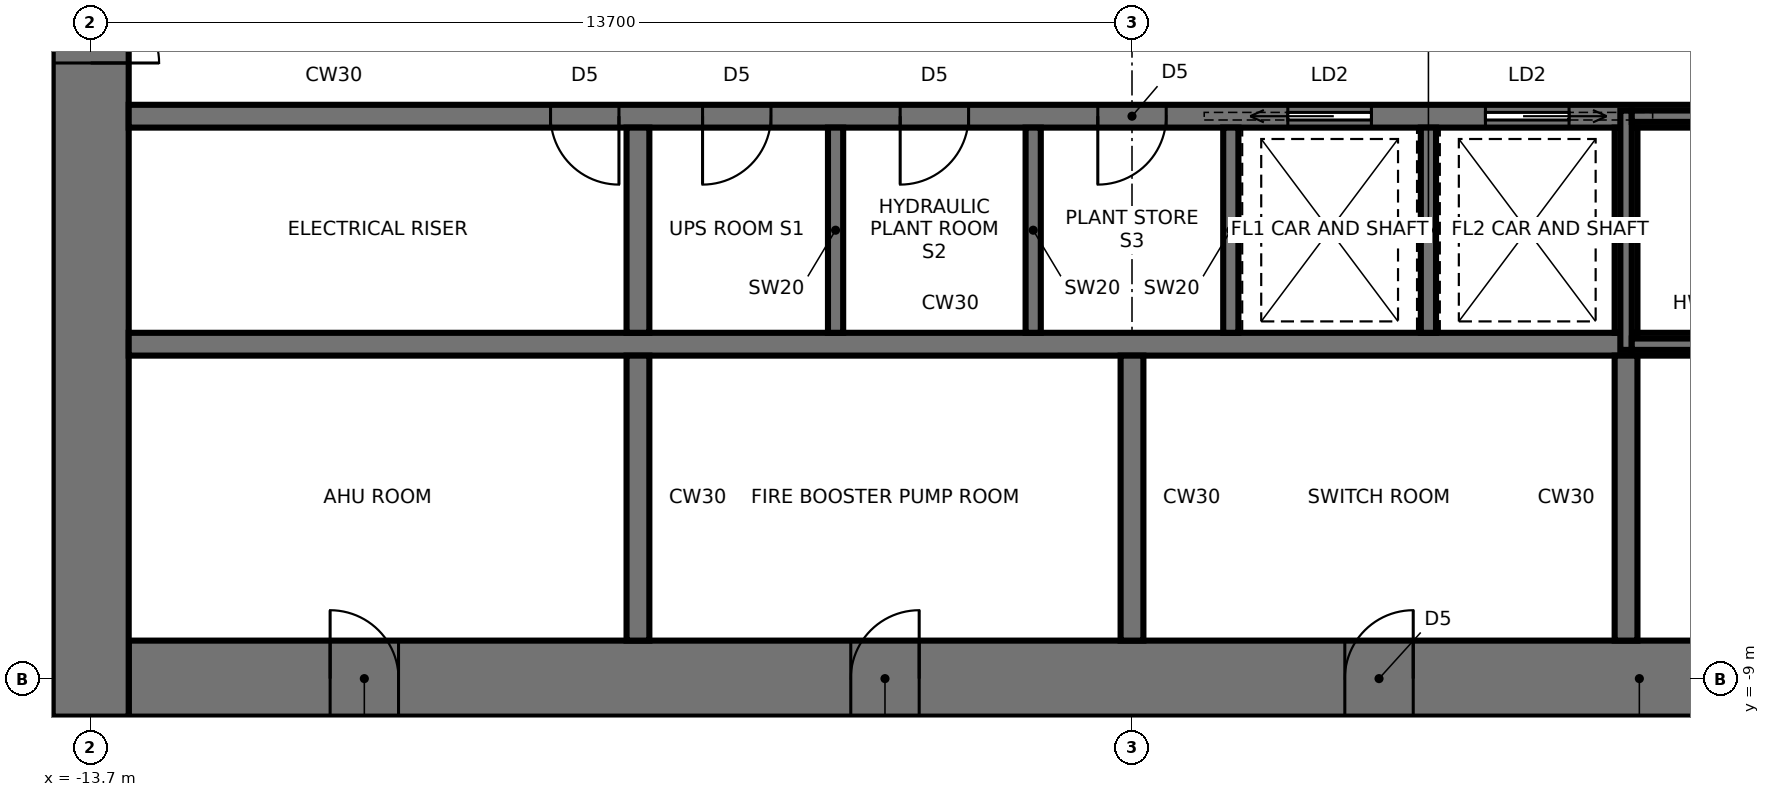
"""IFC4 building model, lengths in metres.
Left out: names, types, materials, properties, quantities, classifications, styles, units other than length and angle.
Written with IfcOpenShell. Run it as: python <this file> out.ifc"""

import sys

from ifc_helpers import new_model, si_unit, direction, frame, frame_2d, origin, place, context, subcontext, project, spatial, rectangle, extrude, element, fill, save


model = new_model("IFC4")
c1 = context("Model", 3, precision=1e-05, world=origin(), true_north=direction((0.0, 1.0)))
c2 = subcontext(c1, "Body", "Model", "MODEL_VIEW")
j1 = project(units=[si_unit("LENGTHUNIT", "METRE"), si_unit("PLANEANGLEUNIT", "RADIAN")], contexts=[c1])
p1 = place(None, origin())
s1 = spatial("IfcSite", under=j1, at=p1, CompositionType="ELEMENT")
p2 = place(p1, origin())
s2 = spatial("IfcBuilding", under=s1, at=p2, CompositionType="ELEMENT")
p3 = place(p2, frame((0.0, 0.0, 277.0)))
s3 = spatial("IfcBuildingStorey", under=s2, at=p3, CompositionType="ELEMENT", Elevation=277.0)
p4 = place(p3, frame((-13.2, -9.0, 0.0), z_axis=(0.0, 0.0, 1.0), x_axis=(1.0, 0.0, 0.0)))
e1 = element("IfcWall", 1, at=p4, inside=s3, PredefinedType="SHEAR", context=c2, shape_type="SweptSolid", body=[
    extrude(rectangle(XDim=26.4, YDim=1.0, at=frame_2d((13.2, 0.0))), origin(), (0.0, 0.0, 1.0), 5.0),
])
p5 = place(p4, frame((2.65, 0.0, 0.0)))
e2 = element("IfcOpeningElement", 2, at=p5, cuts=e1, PredefinedType="OPENING", context=c2, shape_type="SweptSolid", body=[
    extrude(rectangle(XDim=0.9, YDim=2.1, at=frame_2d((0.45, 1.05))), frame((0.0, 0.51, 0.0), z_axis=(0.0, -1.0, 0.0), x_axis=(1.0, 0.0, 0.0)), (0.0, 0.0, 1.0), 1.02),
])
p6 = place(p4, frame((9.5, 0.0, 0.0)))
e3 = element("IfcOpeningElement", 3, at=p6, cuts=e1, PredefinedType="OPENING", context=c2, shape_type="SweptSolid", body=[
    extrude(rectangle(XDim=0.9, YDim=2.1, at=frame_2d((0.45, 1.05))), frame((0.0, 0.51, 0.0), z_axis=(0.0, -1.0, 0.0), x_axis=(1.0, 0.0, 0.0)), (0.0, 0.0, 1.0), 1.02),
])
p7 = place(p4, frame((16.0, 0.0, 0.0)))
e4 = element("IfcOpeningElement", 4, at=p7, cuts=e1, PredefinedType="OPENING", context=c2, shape_type="SweptSolid", body=[
    extrude(rectangle(XDim=0.9, YDim=2.1, at=frame_2d((0.45, 1.05))), frame((0.0, 0.51, 0.0), z_axis=(0.0, -1.0, 0.0), x_axis=(1.0, 0.0, 0.0)), (0.0, 0.0, 1.0), 1.02),
])
p8 = place(p4, frame((22.85, 0.0, 0.0)))
e5 = element("IfcOpeningElement", 5, at=p8, cuts=e1, PredefinedType="OPENING", context=c2, shape_type="SweptSolid", body=[
    extrude(rectangle(XDim=0.9, YDim=2.1, at=frame_2d((0.45, 1.05))), frame((0.0, 0.51, 0.0), z_axis=(0.0, -1.0, 0.0), x_axis=(1.0, 0.0, 0.0)), (0.0, 0.0, 1.0), 1.02),
])
p9 = place(p3, frame((-13.7, 9.5, 0.0), z_axis=(0.0, 0.0, 1.0), x_axis=(0.0, -1.0, 0.0)))
e6 = element("IfcWall", 6, at=p9, inside=s3, PredefinedType="SHEAR", context=c2, shape_type="SweptSolid", body=[
    extrude(rectangle(XDim=19.0, YDim=1.0, at=frame_2d((9.5, 0.0))), origin(), (0.0, 0.0, 1.0), 5.0),
])
p10 = place(p9, frame((8.6, 0.0, 0.0)))
e7 = element("IfcOpeningElement", 7, at=p10, cuts=e6, PredefinedType="OPENING", context=c2, shape_type="SweptSolid", body=[
    extrude(rectangle(XDim=1.8, YDim=2.4, at=frame_2d((0.9, 1.2))), frame((0.0, 0.51, 0.0), z_axis=(0.0, -1.0, 0.0), x_axis=(1.0, 0.0, 0.0)), (0.0, 0.0, 1.0), 1.02),
])
p11 = place(p3, frame((-13.2, -1.6, 0.0), z_axis=(0.0, 0.0, 1.0), x_axis=(1.0, 0.0, 0.0)))
e8 = element("IfcWall", 8, at=p11, inside=s3, PredefinedType="SHEAR", context=c2, shape_type="SweptSolid", body=[
    extrude(rectangle(XDim=26.4, YDim=0.3, at=frame_2d((13.2, 0.0))), origin(), (0.0, 0.0, 1.0), 5.0),
])
p12 = place(p11, frame((25.15, 0.0, 0.0)))
e9 = element("IfcOpeningElement", 9, at=p12, cuts=e8, PredefinedType="OPENING", context=c2, shape_type="SweptSolid", body=[
    extrude(rectangle(XDim=1.0, YDim=2.1, at=frame_2d((0.5, 1.05))), frame((0.0, 0.16, 0.0), z_axis=(0.0, -1.0, 0.0), x_axis=(1.0, 0.0, 0.0)), (0.0, 0.0, 1.0), 0.32),
])
p13 = place(p11, frame((7.55, 0.0, 0.0)))
e10 = element("IfcOpeningElement", 10, at=p13, cuts=e8, PredefinedType="OPENING", context=c2, shape_type="SweptSolid", body=[
    extrude(rectangle(XDim=0.9, YDim=2.1, at=frame_2d((0.45, 1.05))), frame((0.0, 0.16, 0.0), z_axis=(0.0, -1.0, 0.0), x_axis=(1.0, 0.0, 0.0)), (0.0, 0.0, 1.0), 0.32),
])
p14 = place(p11, frame((10.15, 0.0, 0.0)))
e11 = element("IfcOpeningElement", 11, at=p14, cuts=e8, PredefinedType="OPENING", context=c2, shape_type="SweptSolid", body=[
    extrude(rectangle(XDim=0.9, YDim=2.1, at=frame_2d((0.45, 1.05))), frame((0.0, 0.16, 0.0), z_axis=(0.0, -1.0, 0.0), x_axis=(1.0, 0.0, 0.0)), (0.0, 0.0, 1.0), 0.32),
])
p15 = place(p11, frame((12.75, 0.0, 0.0)))
e12 = element("IfcOpeningElement", 12, at=p15, cuts=e8, PredefinedType="OPENING", context=c2, shape_type="SweptSolid", body=[
    extrude(rectangle(XDim=0.9, YDim=2.1, at=frame_2d((0.45, 1.05))), frame((0.0, 0.16, 0.0), z_axis=(0.0, -1.0, 0.0), x_axis=(1.0, 0.0, 0.0)), (0.0, 0.0, 1.0), 0.32),
])
p16 = place(p11, frame((15.25, 0.0, 0.0)))
e13 = element("IfcOpeningElement", 13, at=p16, cuts=e8, PredefinedType="OPENING", context=c2, shape_type="SweptSolid", body=[
    extrude(rectangle(XDim=1.1, YDim=2.3, at=frame_2d((0.55, 1.15))), frame((0.0, 0.16, 0.0), z_axis=(0.0, -1.0, 0.0), x_axis=(1.0, 0.0, 0.0)), (0.0, 0.0, 1.0), 0.32),
])
p17 = place(p11, frame((17.85, 0.0, 0.0)))
e14 = element("IfcOpeningElement", 14, at=p17, cuts=e8, PredefinedType="OPENING", context=c2, shape_type="SweptSolid", body=[
    extrude(rectangle(XDim=1.1, YDim=2.3, at=frame_2d((0.55, 1.15))), frame((0.0, 0.16, 0.0), z_axis=(0.0, -1.0, 0.0), x_axis=(1.0, 0.0, 0.0)), (0.0, 0.0, 1.0), 0.32),
])
p18 = place(p11, frame((5.55, 0.0, 0.0)))
e15 = element("IfcOpeningElement", 15, at=p18, cuts=e8, PredefinedType="OPENING", context=c2, shape_type="SweptSolid", body=[
    extrude(rectangle(XDim=0.9, YDim=2.1, at=frame_2d((0.45, 1.05))), frame((0.0, 0.16, 0.0), z_axis=(0.0, -1.0, 0.0), x_axis=(1.0, 0.0, 0.0)), (0.0, 0.0, 1.0), 0.32),
])
p19 = place(p3, frame((-13.2, -4.6, 0.0), z_axis=(0.0, 0.0, 1.0), x_axis=(1.0, 0.0, 0.0)))
e16 = element("IfcWall", 16, at=p19, inside=s3, PredefinedType="SHEAR", context=c2, shape_type="SweptSolid", body=[
    extrude(rectangle(XDim=26.4, YDim=0.3, at=frame_2d((13.2, 0.0))), origin(), (0.0, 0.0, 1.0), 5.0),
])
p20 = place(p3, frame((-6.5, -1.75, 0.0), z_axis=(0.0, 0.0, 1.0), x_axis=(0.0, -1.0, 0.0)))
e17 = element("IfcWall", 17, at=p20, inside=s3, PredefinedType="SHEAR", context=c2, shape_type="SweptSolid", body=[
    extrude(rectangle(XDim=2.7, YDim=0.3, at=frame_2d((1.35, 0.0))), origin(), (0.0, 0.0, 1.0), 5.0),
])
p21 = place(p3, frame((-6.5, -4.75, 0.0), z_axis=(0.0, 0.0, 1.0), x_axis=(0.0, -1.0, 0.0)))
e18 = element("IfcWall", 18, at=p21, inside=s3, PredefinedType="SHEAR", context=c2, shape_type="SweptSolid", body=[
    extrude(rectangle(XDim=3.75, YDim=0.3, at=frame_2d((1.875, 0.0))), origin(), (0.0, 0.0, 1.0), 5.0),
])
p22 = place(p3, frame((6.5, -1.75, 0.0), z_axis=(0.0, 0.0, 1.0), x_axis=(0.0, -1.0, 0.0)))
e19 = element("IfcWall", 19, at=p22, inside=s3, PredefinedType="SHEAR", context=c2, shape_type="SweptSolid", body=[
    extrude(rectangle(XDim=2.7, YDim=0.3, at=frame_2d((1.35, 0.0))), origin(), (0.0, 0.0, 1.0), 5.0),
])
p23 = place(p3, frame((6.5, -4.75, 0.0), z_axis=(0.0, 0.0, 1.0), x_axis=(0.0, -1.0, 0.0)))
e20 = element("IfcWall", 20, at=p23, inside=s3, PredefinedType="SHEAR", context=c2, shape_type="SweptSolid", body=[
    extrude(rectangle(XDim=3.75, YDim=0.3, at=frame_2d((1.875, 0.0))), origin(), (0.0, 0.0, 1.0), 5.0),
])
for number, where, z_axis, x_axis in (
    (21, (-3.9, -1.75, 0.0), (0.0, 0.0, 1.0), (0.0, -1.0, 0.0)),
    (22, (-1.3, -1.75, 0.0), (0.0, 0.0, 1.0), (0.0, -1.0, 0.0)),
    (23, (1.3, -1.75, 0.0), (0.0, 0.0, 1.0), (0.0, -1.0, 0.0)),
    (24, (3.9, -1.75, 0.0), (0.0, 0.0, 1.0), (0.0, -1.0, 0.0)),
):
    element("IfcWall", number, at=place(p3, frame(where, z_axis=z_axis, x_axis=x_axis)), inside=s3, PredefinedType="SHEAR", context=c2, shape_type="SweptSolid", body=[
        extrude(rectangle(XDim=2.7, YDim=0.2, at=frame_2d((1.35, 0.0))), origin(), (0.0, 0.0, 1.0), 5.0),
    ])
p24 = place(p3, frame((0.0, -4.75, 0.0), z_axis=(0.0, 0.0, 1.0), x_axis=(0.0, -1.0, 0.0)))
e25 = element("IfcWall", 25, at=p24, inside=s3, PredefinedType="SHEAR", context=c2, shape_type="SweptSolid", body=[
    extrude(rectangle(XDim=3.75, YDim=0.3, at=frame_2d((1.875, 0.0))), origin(), (0.0, 0.0, 1.0), 5.0),
])
p25 = place(p3, frame((6.5, -4.675, 5.0), z_axis=(0.0, 0.0, 1.0), x_axis=(0.0, 1.0, 0.0)))
e26 = element("IfcWall", 26, at=p25, inside=s3, PredefinedType="SOLIDWALL", context=c2, shape_type="SweptSolid", body=[
    extrude(rectangle(XDim=3.15, YDim=0.15, at=frame_2d((1.575, 0.0))), origin(), (0.0, 0.0, 1.0), 2.82),
])
p26 = place(p3, frame((6.575, -4.6, 5.0), z_axis=(0.0, 0.0, 1.0), x_axis=(1.0, 0.0, 0.0)))
e27 = element("IfcWall", 27, at=p26, inside=s3, PredefinedType="SOLIDWALL", context=c2, shape_type="SweptSolid", body=[
    extrude(rectangle(XDim=7.05, YDim=0.15, at=frame_2d((3.525, 0.0))), origin(), (0.0, 0.0, 1.0), 2.82),
])
p27 = place(p3, frame((6.575, -1.6, 5.0), z_axis=(0.0, 0.0, 1.0), x_axis=(1.0, 0.0, 0.0)))
e28 = element("IfcWall", 28, at=p27, inside=s3, PredefinedType="SOLIDWALL", context=c2, shape_type="SweptSolid", body=[
    extrude(rectangle(XDim=7.05, YDim=0.15, at=frame_2d((3.525, 0.0))), origin(), (0.0, 0.0, 1.0), 2.82),
])
p28 = place(p27, frame((0.5, 0.0, 1.9)))
e29 = element("IfcOpeningElement", 29, at=p28, cuts=e28, PredefinedType="OPENING", context=c2, shape_type="SweptSolid", body=[
    extrude(rectangle(XDim=0.9, YDim=0.6, at=frame_2d((0.45, 0.3))), frame((0.0, 0.085, 0.0), z_axis=(0.0, -1.0, 0.0), x_axis=(1.0, 0.0, 0.0)), (0.0, 0.0, 1.0), 0.17),
])
p29 = place(p10, origin())
e30 = element("IfcDoor", 30, at=p29, inside=s3, OperationType="DOUBLE_DOOR_SINGLE_SWING", PredefinedType="DOOR", context=c2, shape_type="SweptSolid", body=[
    extrude(rectangle(XDim=1.72, YDim=2.36, at=frame_2d((0.9, 1.18))), frame((0.0, 0.025, 0.0), z_axis=(0.0, -1.0, 0.0), x_axis=(1.0, 0.0, 0.0)), (0.0, 0.0, 1.0), 0.05),
    extrude(rectangle(XDim=0.04, YDim=2.4, at=frame_2d((0.02, 1.2))), frame((0.0, 0.25, 0.0), z_axis=(0.0, -1.0, 0.0), x_axis=(1.0, 0.0, 0.0)), (0.0, 0.0, 1.0), 0.5),
    extrude(rectangle(XDim=0.04, YDim=2.4, at=frame_2d((1.78, 1.2))), frame((0.0, 0.25, 0.0), z_axis=(0.0, -1.0, 0.0), x_axis=(1.0, 0.0, 0.0)), (0.0, 0.0, 1.0), 0.5),
    extrude(rectangle(XDim=1.72, YDim=0.04, at=frame_2d((0.9, 2.38))), frame((0.0, 0.25, 0.0), z_axis=(0.0, -1.0, 0.0), x_axis=(1.0, 0.0, 0.0)), (0.0, 0.0, 1.0), 0.5),
])
fill(e7, e30)
p30 = place(p13, frame((0.9, 0.0, 0.0), z_axis=(0.0, 0.0, 1.0), x_axis=(-1.0, 0.0, 0.0)))
e31 = element("IfcDoor", 31, at=p30, inside=s3, OperationType="SINGLE_SWING_RIGHT", PredefinedType="DOOR", context=c2, shape_type="SweptSolid", body=[
    extrude(rectangle(XDim=0.9, YDim=2.1, at=frame_2d((0.45, 1.05))), frame((0.0, 0.025, 0.0), z_axis=(0.0, -1.0, 0.0), x_axis=(1.0, 0.0, 0.0)), (0.0, 0.0, 1.0), 0.05),
])
fill(e10, e31)
p31 = place(p14, frame((0.9, 0.0, 0.0), z_axis=(0.0, 0.0, 1.0), x_axis=(-1.0, 0.0, 0.0)))
e32 = element("IfcDoor", 32, at=p31, inside=s3, OperationType="SINGLE_SWING_RIGHT", PredefinedType="DOOR", context=c2, shape_type="SweptSolid", body=[
    extrude(rectangle(XDim=0.9, YDim=2.1, at=frame_2d((0.45, 1.05))), frame((0.0, 0.025, 0.0), z_axis=(0.0, -1.0, 0.0), x_axis=(1.0, 0.0, 0.0)), (0.0, 0.0, 1.0), 0.05),
])
fill(e11, e32)
p32 = place(p15, frame((0.9, 0.0, 0.0), z_axis=(0.0, 0.0, 1.0), x_axis=(-1.0, 0.0, 0.0)))
e33 = element("IfcDoor", 33, at=p32, inside=s3, OperationType="SINGLE_SWING_RIGHT", PredefinedType="DOOR", context=c2, shape_type="SweptSolid", body=[
    extrude(rectangle(XDim=0.9, YDim=2.1, at=frame_2d((0.45, 1.05))), frame((0.0, 0.025, 0.0), z_axis=(0.0, -1.0, 0.0), x_axis=(1.0, 0.0, 0.0)), (0.0, 0.0, 1.0), 0.05),
])
fill(e12, e33)
p33 = place(p16, frame((1.1, 0.0, 0.0), z_axis=(0.0, 0.0, 1.0), x_axis=(-1.0, 0.0, 0.0)))
e34 = element("IfcDoor", 34, at=p33, inside=s3, OperationType="SLIDING_TO_RIGHT", PredefinedType="DOOR", context=c2, shape_type="SweptSolid", body=[
    extrude(rectangle(XDim=1.1, YDim=2.3, at=frame_2d((0.55, 1.15))), frame((0.0, 0.025, 0.0), z_axis=(0.0, -1.0, 0.0), x_axis=(1.0, 0.0, 0.0)), (0.0, 0.0, 1.0), 0.05),
])
fill(e13, e34)
p34 = place(p17, frame((1.1, 0.0, 0.0), z_axis=(0.0, 0.0, 1.0), x_axis=(-1.0, 0.0, 0.0)))
e35 = element("IfcDoor", 35, at=p34, inside=s3, OperationType="SLIDING_TO_LEFT", PredefinedType="DOOR", context=c2, shape_type="SweptSolid", body=[
    extrude(rectangle(XDim=1.1, YDim=2.3, at=frame_2d((0.55, 1.15))), frame((0.0, 0.025, 0.0), z_axis=(0.0, -1.0, 0.0), x_axis=(1.0, 0.0, 0.0)), (0.0, 0.0, 1.0), 0.05),
])
fill(e14, e35)
p35 = place(p18, frame((0.9, 0.0, 0.0), z_axis=(0.0, 0.0, 1.0), x_axis=(-1.0, 0.0, 0.0)))
e36 = element("IfcDoor", 36, at=p35, inside=s3, OperationType="SINGLE_SWING_LEFT", PredefinedType="DOOR", context=c2, shape_type="SweptSolid", body=[
    extrude(rectangle(XDim=0.9, YDim=2.1, at=frame_2d((0.45, 1.05))), frame((0.0, 0.025, 0.0), z_axis=(0.0, -1.0, 0.0), x_axis=(1.0, 0.0, 0.0)), (0.0, 0.0, 1.0), 0.05),
])
fill(e15, e36)
p36 = place(p5, origin())
e37 = element("IfcDoor", 37, at=p36, inside=s3, OperationType="SINGLE_SWING_LEFT", PredefinedType="DOOR", context=c2, shape_type="SweptSolid", body=[
    extrude(rectangle(XDim=0.82, YDim=2.06, at=frame_2d((0.45, 1.03))), frame((0.0, 0.025, 0.0), z_axis=(0.0, -1.0, 0.0), x_axis=(1.0, 0.0, 0.0)), (0.0, 0.0, 1.0), 0.05),
    extrude(rectangle(XDim=0.04, YDim=2.1, at=frame_2d((0.02, 1.05))), frame((0.0, 0.25, 0.0), z_axis=(0.0, -1.0, 0.0), x_axis=(1.0, 0.0, 0.0)), (0.0, 0.0, 1.0), 0.5),
    extrude(rectangle(XDim=0.04, YDim=2.1, at=frame_2d((0.88, 1.05))), frame((0.0, 0.25, 0.0), z_axis=(0.0, -1.0, 0.0), x_axis=(1.0, 0.0, 0.0)), (0.0, 0.0, 1.0), 0.5),
    extrude(rectangle(XDim=0.82, YDim=0.04, at=frame_2d((0.45, 2.08))), frame((0.0, 0.25, 0.0), z_axis=(0.0, -1.0, 0.0), x_axis=(1.0, 0.0, 0.0)), (0.0, 0.0, 1.0), 0.5),
])
fill(e2, e37)
p37 = place(p6, origin())
e38 = element("IfcDoor", 38, at=p37, inside=s3, OperationType="SINGLE_SWING_RIGHT", PredefinedType="DOOR", context=c2, shape_type="SweptSolid", body=[
    extrude(rectangle(XDim=0.82, YDim=2.06, at=frame_2d((0.45, 1.03))), frame((0.0, 0.025, 0.0), z_axis=(0.0, -1.0, 0.0), x_axis=(1.0, 0.0, 0.0)), (0.0, 0.0, 1.0), 0.05),
    extrude(rectangle(XDim=0.04, YDim=2.1, at=frame_2d((0.02, 1.05))), frame((0.0, 0.25, 0.0), z_axis=(0.0, -1.0, 0.0), x_axis=(1.0, 0.0, 0.0)), (0.0, 0.0, 1.0), 0.5),
    extrude(rectangle(XDim=0.04, YDim=2.1, at=frame_2d((0.88, 1.05))), frame((0.0, 0.25, 0.0), z_axis=(0.0, -1.0, 0.0), x_axis=(1.0, 0.0, 0.0)), (0.0, 0.0, 1.0), 0.5),
    extrude(rectangle(XDim=0.82, YDim=0.04, at=frame_2d((0.45, 2.08))), frame((0.0, 0.25, 0.0), z_axis=(0.0, -1.0, 0.0), x_axis=(1.0, 0.0, 0.0)), (0.0, 0.0, 1.0), 0.5),
])
fill(e3, e38)
p38 = place(p7, origin())
e39 = element("IfcDoor", 39, at=p38, inside=s3, OperationType="SINGLE_SWING_RIGHT", PredefinedType="DOOR", context=c2, shape_type="SweptSolid", body=[
    extrude(rectangle(XDim=0.82, YDim=2.06, at=frame_2d((0.45, 1.03))), frame((0.0, 0.025, 0.0), z_axis=(0.0, -1.0, 0.0), x_axis=(1.0, 0.0, 0.0)), (0.0, 0.0, 1.0), 0.05),
    extrude(rectangle(XDim=0.04, YDim=2.1, at=frame_2d((0.02, 1.05))), frame((0.0, 0.25, 0.0), z_axis=(0.0, -1.0, 0.0), x_axis=(1.0, 0.0, 0.0)), (0.0, 0.0, 1.0), 0.5),
    extrude(rectangle(XDim=0.04, YDim=2.1, at=frame_2d((0.88, 1.05))), frame((0.0, 0.25, 0.0), z_axis=(0.0, -1.0, 0.0), x_axis=(1.0, 0.0, 0.0)), (0.0, 0.0, 1.0), 0.5),
    extrude(rectangle(XDim=0.82, YDim=0.04, at=frame_2d((0.45, 2.08))), frame((0.0, 0.25, 0.0), z_axis=(0.0, -1.0, 0.0), x_axis=(1.0, 0.0, 0.0)), (0.0, 0.0, 1.0), 0.5),
])
fill(e4, e39)
save(model, sys.argv[1])
